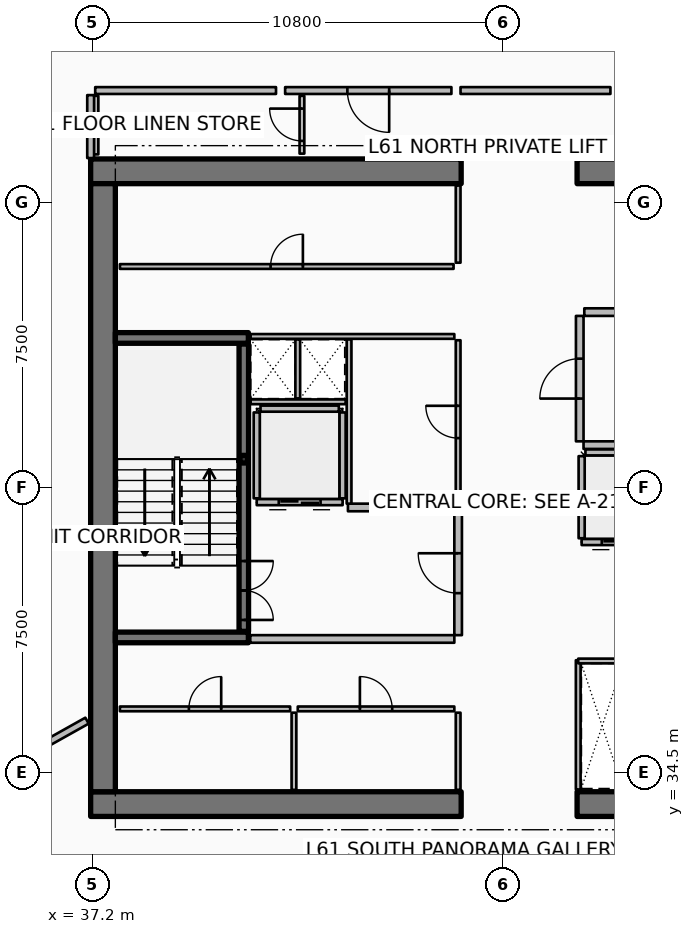
"""IFC4 building model, lengths in metres.
Left out: names, types, materials, properties, quantities, classifications, styles, units other than length and angle.
Written with IfcOpenShell. Run it as: python <this file> out.ifc"""

import sys

from ifc_helpers import new_model, si_unit, direction, frame, frame_2d, origin, origin_2d, place, context, subcontext, project, spatial, rectangle, hollow_rectangle, extrude, element, fill, save


model = new_model("IFC4")
c1 = context("Model", 3, precision=1e-05, world=origin(), true_north=direction((0.0, 1.0)))
c2 = subcontext(c1, "Body", "Model", "MODEL_VIEW")
j1 = project(units=[si_unit("LENGTHUNIT", "METRE"), si_unit("PLANEANGLEUNIT", "RADIAN")], contexts=[c1])
p1 = place(None, origin())
s1 = spatial("IfcSite", under=j1, at=p1, CompositionType="ELEMENT")
p2 = place(p1, origin())
s2 = spatial("IfcBuilding", under=s1, at=p2, CompositionType="ELEMENT")
p3 = place(p2, frame((0.0, 0.0, 244.4)))
s3 = spatial("IfcBuildingStorey", under=s2, at=p3, CompositionType="ELEMENT", Elevation=244.4)
for number, where, z_axis, x_axis in (
    (1, (37.15, 33.675, 0.0), (0.0, 0.0, 1.0), (1.0, 0.0, 0.0)),
    (2, (49.95, 33.675, 0.0), (0.0, 0.0, 1.0), (1.0, 0.0, 0.0)),
    (3, (37.15, 50.325, 0.0), (0.0, 0.0, 1.0), (1.0, 0.0, 0.0)),
    (4, (49.95, 50.325, 0.0), (0.0, 0.0, 1.0), (1.0, 0.0, 0.0)),
):
    element("IfcWall", number, at=place(p3, frame(where, z_axis=z_axis, x_axis=x_axis)), inside=s3, PredefinedType="SHEAR", context=c2, shape_type="SweptSolid", body=[
        extrude(rectangle(XDim=9.75, YDim=0.65, at=frame_2d((4.875, 0.0))), origin(), (0.0, 0.0, 1.0), 3.85),
    ])
p4 = place(p3, frame((37.475, 34.0, 0.0), z_axis=(0.0, 0.0, 1.0), x_axis=(0.0, 1.0, 0.0)))
e5 = element("IfcWall", 5, at=p4, inside=s3, PredefinedType="SHEAR", context=c2, shape_type="SweptSolid", body=[
    extrude(rectangle(XDim=16.0, YDim=0.65, at=frame_2d((8.0, 0.0))), origin(), (0.0, 0.0, 1.0), 3.85),
])
for number, where, z_axis, x_axis in (
    (6, (37.8, 38.06, 0.0), (0.0, 0.0, 1.0), (1.0, 0.0, 0.0)),
    (7, (37.8, 45.94, 0.0), (0.0, 0.0, 1.0), (1.0, 0.0, 0.0)),
):
    element("IfcWall", number, at=place(p3, frame(where, z_axis=z_axis, x_axis=x_axis)), inside=s3, PredefinedType="SHEAR", context=c2, shape_type="SweptSolid", body=[
        extrude(rectangle(XDim=3.5, YDim=0.28, at=frame_2d((1.75, 0.0))), origin(), (0.0, 0.0, 1.0), 3.85),
    ])
p5 = place(p3, frame((41.18, 42.75, 0.0), z_axis=(0.0, 0.0, 1.0), x_axis=(1.0, 0.0, 0.0)))
e8 = element("IfcColumn", 8, at=p5, inside=s3, PredefinedType="COLUMN", context=c2, shape_type="SweptSolid", body=[
    extrude(hollow_rectangle(XDim=0.2, YDim=0.2, WallThickness=0.01, InnerFilletRadius=0.01, OuterFilletRadius=0.02, at=origin_2d()), origin(), (0.0, 0.0, 1.0), 1.72),
])
p6 = place(p3, frame((41.18, 38.22, 0.0), z_axis=(0.0, 0.0, 1.0), x_axis=(0.0, 1.0, 0.0)))
e9 = element("IfcWall", 9, at=p6, inside=s3, PredefinedType="SOLIDWALL", context=c2, shape_type="SweptSolid", body=[
    extrude(rectangle(XDim=7.56, YDim=0.25, at=frame_2d((3.78, 0.0))), origin(), (0.0, 0.0, 1.0), 3.59),
])
p7 = place(p6, frame((0.3, 0.0, 0.0)))
e10 = element("IfcOpeningElement", 10, at=p7, cuts=e9, PredefinedType="OPENING", context=c2, shape_type="SweptSolid", body=[
    extrude(rectangle(XDim=1.55, YDim=2.15, at=frame_2d((0.775, 1.075))), frame((0.0, 0.135, 0.0), z_axis=(0.0, -1.0, 0.0), x_axis=(1.0, 0.0, 0.0)), (0.0, 0.0, 1.0), 0.27),
])
p8 = place(p3, frame((43.78, 41.62, 0.0), z_axis=(0.0, 0.0, 1.0), x_axis=(-1.0, 0.0, 0.0)))
e11 = element("IfcWall", 11, at=p8, inside=s3, PredefinedType="PARTITIONING", context=c2, shape_type="SweptSolid", body=[
    extrude(rectangle(XDim=2.26, YDim=0.16, at=frame_2d((1.13, 0.0))), origin(), (0.0, 0.0, 1.0), 3.59),
])
p9 = place(p8, frame((0.58, 0.0, 0.0)))
e12 = element("IfcOpeningElement", 12, at=p9, cuts=e11, PredefinedType="OPENING", context=c2, shape_type="SweptSolid", body=[
    extrude(rectangle(XDim=1.1, YDim=2.1, at=frame_2d((0.55, 1.05))), frame((0.0, 0.09, 0.0), z_axis=(0.0, -1.0, 0.0), x_axis=(1.0, 0.0, 0.0)), (0.0, 0.0, 1.0), 0.18),
])
for number, where, z_axis, x_axis in (
    (13, (43.78, 41.72, 0.0), (0.0, 0.0, 1.0), (0.0, 1.0, 0.0)),
    (14, (41.52, 41.72, 0.0), (0.0, 0.0, 1.0), (0.0, 1.0, 0.0)),
):
    element("IfcWall", number, at=place(p3, frame(where, z_axis=z_axis, x_axis=x_axis)), inside=s3, PredefinedType="PARTITIONING", context=c2, shape_type="SweptSolid", body=[
        extrude(rectangle(XDim=2.26, YDim=0.16, at=frame_2d((1.13, 0.0))), origin(), (0.0, 0.0, 1.0), 3.59),
    ])
p10 = place(p3, frame((41.62, 44.08, 0.0), z_axis=(0.0, 0.0, 1.0), x_axis=(1.0, 0.0, 0.0)))
e15 = element("IfcWall", 15, at=p10, inside=s3, PredefinedType="PARTITIONING", context=c2, shape_type="SweptSolid", body=[
    extrude(rectangle(XDim=2.06, YDim=0.16, at=frame_2d((1.03, 0.0))), origin(), (0.0, 0.0, 1.0), 3.59),
])
p11 = place(p3, frame((52.23, 40.57, 0.0), z_axis=(0.0, 0.0, 1.0), x_axis=(-1.0, 0.0, 0.0)))
e16 = element("IfcWall", 16, at=p11, inside=s3, PredefinedType="PARTITIONING", context=c2, shape_type="SweptSolid", body=[
    extrude(rectangle(XDim=2.16, YDim=0.16, at=frame_2d((1.08, 0.0))), origin(), (0.0, 0.0, 1.0), 3.59),
])
p12 = place(p11, frame((0.53, 0.0, 0.0)))
e17 = element("IfcOpeningElement", 17, at=p12, cuts=e16, PredefinedType="OPENING", context=c2, shape_type="SweptSolid", body=[
    extrude(rectangle(XDim=1.1, YDim=2.1, at=frame_2d((0.55, 1.05))), frame((0.0, 0.09, 0.0), z_axis=(0.0, -1.0, 0.0), x_axis=(1.0, 0.0, 0.0)), (0.0, 0.0, 1.0), 0.18),
])
p13 = place(p3, frame((50.07, 40.67, 0.0), z_axis=(0.0, 0.0, 1.0), x_axis=(0.0, 1.0, 0.0)))
e18 = element("IfcWall", 18, at=p13, inside=s3, PredefinedType="PARTITIONING", context=c2, shape_type="SweptSolid", body=[
    extrude(rectangle(XDim=2.16, YDim=0.16, at=frame_2d((1.08, 0.0))), origin(), (0.0, 0.0, 1.0), 3.59),
])
p14 = place(p3, frame((50.17, 42.93, 0.0), z_axis=(0.0, 0.0, 1.0), x_axis=(1.0, 0.0, 0.0)))
e19 = element("IfcWall", 19, at=p14, inside=s3, PredefinedType="PARTITIONING", context=c2, shape_type="SweptSolid", body=[
    extrude(rectangle(XDim=1.96, YDim=0.16, at=frame_2d((0.98, 0.0))), origin(), (0.0, 0.0, 1.0), 3.59),
])
for number, where, z_axis, x_axis in (
    (20, (46.82, 34.05, 0.0), (0.0, 0.0, 1.0), (0.0, 1.0, 0.0)),
    (21, (42.5, 34.05, 0.0), (0.0, 0.0, 1.0), (0.0, 1.0, 0.0)),
):
    element("IfcWall", number, at=place(p3, frame(where, z_axis=z_axis, x_axis=x_axis)), inside=s3, PredefinedType="PARTITIONING", context=c2, shape_type="SweptSolid", body=[
        extrude(rectangle(XDim=2.03, YDim=0.125, at=frame_2d((1.015, 0.0))), origin(), (0.0, 0.0, 1.0), 3.03),
    ])
p15 = place(p3, frame((37.92, 36.18, 0.0), z_axis=(0.0, 0.0, 1.0), x_axis=(1.0, 0.0, 0.0)))
e22 = element("IfcWall", 22, at=p15, inside=s3, PredefinedType="PARTITIONING", context=c2, shape_type="SweptSolid", body=[
    extrude(rectangle(XDim=4.48, YDim=0.125, at=frame_2d((2.24, 0.0))), origin(), (0.0, 0.0, 1.0), 3.03),
])
p16 = place(p15, frame((1.815, 0.0, 0.0)))
e23 = element("IfcOpeningElement", 23, at=p16, cuts=e22, PredefinedType="OPENING", context=c2, shape_type="SweptSolid", body=[
    extrude(rectangle(XDim=0.85, YDim=2.06, at=frame_2d((0.425, 1.03))), frame((0.0, 0.073, 0.0), z_axis=(0.0, -1.0, 0.0), x_axis=(1.0, 0.0, 0.0)), (0.0, 0.0, 1.0), 0.145),
])
p17 = place(p3, frame((42.6, 36.18, 0.0), z_axis=(0.0, 0.0, 1.0), x_axis=(1.0, 0.0, 0.0)))
e24 = element("IfcWall", 24, at=p17, inside=s3, PredefinedType="PARTITIONING", context=c2, shape_type="SweptSolid", body=[
    extrude(rectangle(XDim=4.12, YDim=0.125, at=frame_2d((2.06, 0.0))), origin(), (0.0, 0.0, 1.0), 3.03),
])
p18 = place(p17, frame((1.635, 0.0, 0.0)))
e25 = element("IfcOpeningElement", 25, at=p18, cuts=e24, PredefinedType="OPENING", context=c2, shape_type="SweptSolid", body=[
    extrude(rectangle(XDim=0.85, YDim=2.06, at=frame_2d((0.425, 1.03))), frame((0.0, 0.073, 0.0), z_axis=(0.0, -1.0, 0.0), x_axis=(1.0, 0.0, 0.0)), (0.0, 0.0, 1.0), 0.145),
])
p19 = place(p3, frame((46.82, 47.92, 0.0), z_axis=(0.0, 0.0, 1.0), x_axis=(0.0, 1.0, 0.0)))
e26 = element("IfcWall", 26, at=p19, inside=s3, PredefinedType="PARTITIONING", context=c2, shape_type="SweptSolid", body=[
    extrude(rectangle(XDim=2.03, YDim=0.125, at=frame_2d((1.015, 0.0))), origin(), (0.0, 0.0, 1.0), 3.03),
])
p20 = place(p3, frame((37.92, 47.82, 0.0), z_axis=(0.0, 0.0, 1.0), x_axis=(1.0, 0.0, 0.0)))
e27 = element("IfcWall", 27, at=p20, inside=s3, PredefinedType="PARTITIONING", context=c2, shape_type="SweptSolid", body=[
    extrude(rectangle(XDim=8.78, YDim=0.125, at=frame_2d((4.39, 0.0))), origin(), (0.0, 0.0, 1.0), 3.03),
])
p21 = place(p20, frame((3.965, 0.0, 0.0)))
e28 = element("IfcOpeningElement", 28, at=p21, cuts=e27, PredefinedType="OPENING", context=c2, shape_type="SweptSolid", body=[
    extrude(rectangle(XDim=0.85, YDim=2.06, at=frame_2d((0.425, 1.03))), frame((0.0, 0.073, 0.0), z_axis=(0.0, -1.0, 0.0), x_axis=(1.0, 0.0, 0.0)), (0.0, 0.0, 1.0), 0.145),
])
p22 = place(p3, frame((41.35, 38.02, 0.0), z_axis=(0.0, 0.0, 1.0), x_axis=(1.0, 0.0, 0.0)))
e29 = element("IfcWall", 29, at=p22, inside=s3, PredefinedType="PARTITIONING", context=c2, shape_type="SweptSolid", body=[
    extrude(rectangle(XDim=5.37, YDim=0.2, at=frame_2d((2.685, 0.0))), origin(), (0.0, 0.0, 1.0), 3.59),
])
p23 = place(p3, frame((43.92, 41.48, 0.0), z_axis=(0.0, 0.0, 1.0), x_axis=(1.0, 0.0, 0.0)))
e30 = element("IfcWall", 30, at=p23, inside=s3, PredefinedType="PARTITIONING", context=c2, shape_type="SweptSolid", body=[
    extrude(rectangle(XDim=2.8, YDim=0.2, at=frame_2d((1.4, 0.0))), origin(), (0.0, 0.0, 1.0), 3.59),
])
p24 = place(p3, frame((46.82, 38.12, 0.0), z_axis=(0.0, 0.0, 1.0), x_axis=(0.0, 1.0, 0.0)))
e31 = element("IfcWall", 31, at=p24, inside=s3, PredefinedType="PARTITIONING", context=c2, shape_type="SweptSolid", body=[
    extrude(rectangle(XDim=3.26, YDim=0.2, at=frame_2d((1.63, 0.0))), origin(), (0.0, 0.0, 1.0), 3.59),
])
p25 = place(p24, frame((1.105, 0.0, 0.0)))
e32 = element("IfcOpeningElement", 32, at=p25, cuts=e31, PredefinedType="OPENING", context=c2, shape_type="SweptSolid", body=[
    extrude(rectangle(XDim=1.05, YDim=2.1, at=frame_2d((0.525, 1.05))), frame((0.0, 0.11, 0.0), z_axis=(0.0, -1.0, 0.0), x_axis=(1.0, 0.0, 0.0)), (0.0, 0.0, 1.0), 0.22),
])
p26 = place(p3, frame((50.12, 43.12, 0.0), z_axis=(0.0, 0.0, 1.0), x_axis=(1.0, 0.0, 0.0)))
e33 = element("IfcWall", 33, at=p26, inside=s3, PredefinedType="PARTITIONING", context=c2, shape_type="SweptSolid", body=[
    extrude(rectangle(XDim=8.88, YDim=0.2, at=frame_2d((4.44, 0.0))), origin(), (0.0, 0.0, 1.0), 3.59),
])
p27 = place(p3, frame((50.14, 46.62, 0.0), z_axis=(0.0, 0.0, 1.0), x_axis=(1.0, 0.0, 0.0)))
e34 = element("IfcWall", 34, at=p27, inside=s3, PredefinedType="PARTITIONING", context=c2, shape_type="SweptSolid", body=[
    extrude(rectangle(XDim=1.02, YDim=0.2, at=frame_2d((0.51, 0.0))), origin(), (0.0, 0.0, 1.0), 3.59),
])
p28 = place(p3, frame((50.02, 43.22, 0.0), z_axis=(0.0, 0.0, 1.0), x_axis=(0.0, 1.0, 0.0)))
e35 = element("IfcWall", 35, at=p28, inside=s3, PredefinedType="PARTITIONING", context=c2, shape_type="SweptSolid", body=[
    extrude(rectangle(XDim=3.3, YDim=0.2, at=frame_2d((1.65, 0.0))), origin(), (0.0, 0.0, 1.0), 3.59),
])
p29 = place(p28, frame((1.125, 0.0, 0.0)))
e36 = element("IfcOpeningElement", 36, at=p29, cuts=e35, PredefinedType="OPENING", context=c2, shape_type="SweptSolid", body=[
    extrude(rectangle(XDim=1.05, YDim=2.1, at=frame_2d((0.525, 1.05))), frame((0.0, 0.11, 0.0), z_axis=(0.0, -1.0, 0.0), x_axis=(1.0, 0.0, 0.0)), (0.0, 0.0, 1.0), 0.22),
])
p30 = place(p3, frame((41.36, 45.98, 0.0), z_axis=(0.0, 0.0, 1.0), x_axis=(1.0, 0.0, 0.0)))
e37 = element("IfcWall", 37, at=p30, inside=s3, PredefinedType="PARTITIONING", context=c2, shape_type="SweptSolid", body=[
    extrude(rectangle(XDim=5.36, YDim=0.125, at=frame_2d((2.68, 0.0))), origin(), (0.0, 0.0, 1.0), 3.03),
])
p31 = place(p3, frame((41.36, 44.26, 0.0), z_axis=(0.0, 0.0, 1.0), x_axis=(1.0, 0.0, 0.0)))
e38 = element("IfcWall", 38, at=p31, inside=s3, PredefinedType="PARTITIONING", context=c2, shape_type="SweptSolid", body=[
    extrude(rectangle(XDim=2.5, YDim=0.125, at=frame_2d((1.25, 0.0))), origin(), (0.0, 0.0, 1.0), 3.03),
])
p32 = place(p3, frame((42.6, 44.35, 0.0), z_axis=(0.0, 0.0, 1.0), x_axis=(0.0, 1.0, 0.0)))
e39 = element("IfcWall", 39, at=p32, inside=s3, PredefinedType="PARTITIONING", context=c2, shape_type="SweptSolid", body=[
    extrude(rectangle(XDim=1.55, YDim=0.125, at=frame_2d((0.775, 0.0))), origin(), (0.0, 0.0, 1.0), 3.03),
])
p33 = place(p3, frame((49.98, 34.06, 0.0), z_axis=(0.0, 0.0, 1.0), x_axis=(0.0, 1.0, 0.0)))
e40 = element("IfcWall", 40, at=p33, inside=s3, PredefinedType="PARTITIONING", context=c2, shape_type="SweptSolid", body=[
    extrude(rectangle(XDim=3.4, YDim=0.125, at=frame_2d((1.7, 0.0))), origin(), (0.0, 0.0, 1.0), 3.03),
])
p34 = place(p3, frame((49.98, 37.44, 0.0), z_axis=(0.0, 0.0, 1.0), x_axis=(1.0, 0.0, 0.0)))
e41 = element("IfcWall", 41, at=p34, inside=s3, PredefinedType="PARTITIONING", context=c2, shape_type="SweptSolid", body=[
    extrude(rectangle(XDim=1.26, YDim=0.125, at=frame_2d((0.63, 0.0))), origin(), (0.0, 0.0, 1.0), 3.03),
])
p35 = place(p3, frame((43.95, 41.58, 0.0), z_axis=(0.0, 0.0, 1.0), x_axis=(0.0, 1.0, 0.0)))
e42 = element("IfcWall", 42, at=p35, inside=s3, PredefinedType="PARTITIONING", context=c2, shape_type="SweptSolid", body=[
    extrude(rectangle(XDim=4.32, YDim=0.125, at=frame_2d((2.16, 0.0))), origin(), (0.0, 0.0, 1.0), 3.03),
])
p36 = place(p3, frame((46.82, 41.58, 0.0), z_axis=(0.0, 0.0, 1.0), x_axis=(0.0, 1.0, 0.0)))
e43 = element("IfcWall", 43, at=p36, inside=s3, PredefinedType="PARTITIONING", context=c2, shape_type="SweptSolid", body=[
    extrude(rectangle(XDim=4.3, YDim=0.125, at=frame_2d((2.15, 0.0))), origin(), (0.0, 0.0, 1.0), 3.03),
])
p37 = place(p36, frame((1.725, 0.0, 0.0)))
e44 = element("IfcOpeningElement", 44, at=p37, cuts=e43, PredefinedType="OPENING", context=c2, shape_type="SweptSolid", body=[
    extrude(rectangle(XDim=0.85, YDim=2.06, at=frame_2d((0.425, 1.03))), frame((0.0, 0.073, 0.0), z_axis=(0.0, -1.0, 0.0), x_axis=(1.0, 0.0, 0.0)), (0.0, 0.0, 1.0), 0.145),
])
p38 = place(p3, frame((37.29, 50.77, 0.0), z_axis=(0.0, 0.0, 1.0), x_axis=(0.0, 1.0, 0.0)))
e45 = element("IfcWall", 45, at=p38, inside=s3, PredefinedType="PARTITIONING", context=c2, shape_type="SweptSolid", body=[
    extrude(rectangle(XDim=1.54, YDim=0.125, at=frame_2d((0.77, 0.0))), origin(), (0.0, 0.0, 1.0), 3.03),
])
p39 = place(p3, frame((42.71, 50.79, 0.0), z_axis=(0.0, 0.0, 1.0), x_axis=(0.0, 1.0, 0.0)))
e46 = element("IfcWall", 46, at=p39, inside=s3, PredefinedType="PARTITIONING", context=c2, shape_type="SweptSolid", body=[
    extrude(rectangle(XDim=1.52, YDim=0.125, at=frame_2d((0.76, 0.0))), origin(), (0.0, 0.0, 1.0), 2.957),
])
p40 = place(p39, frame((0.335, 0.0, 0.0)))
e47 = element("IfcOpeningElement", 47, at=p40, cuts=e46, PredefinedType="OPENING", context=c2, shape_type="SweptSolid", body=[
    extrude(rectangle(XDim=0.85, YDim=2.06, at=frame_2d((0.425, 1.03))), frame((0.0, 0.073, 0.0), z_axis=(0.0, -1.0, 0.0), x_axis=(1.0, 0.0, 0.0)), (0.0, 0.0, 1.0), 0.145),
])
p41 = place(p3, frame((37.054, 35.87, 0.0), z_axis=(0.0, 0.0, 1.0), x_axis=(-0.872490186067, -0.488631635506, 0.0)))
e48 = element("IfcWall", 48, at=p41, inside=s3, PredefinedType="PARTITIONING", context=c2, shape_type="SweptSolid", body=[
    extrude(rectangle(XDim=17.884, YDim=0.18, at=frame_2d((8.942, 0.0))), origin(), (0.0, 0.0, 1.0), 2.957),
])
p42 = place(p3, frame((46.643, 52.45, 0.0), z_axis=(0.0, 0.0, 1.0), x_axis=(-1.0, 0.0, 0.0)))
e49 = element("IfcWall", 49, at=p42, inside=s3, PredefinedType="PARTITIONING", context=c2, shape_type="SweptSolid", body=[
    extrude(rectangle(XDim=4.376, YDim=0.18, at=frame_2d((2.188, 0.0))), origin(), (0.0, 0.0, 1.0), 2.957),
])
p43 = place(p42, frame((1.638, 0.0, 0.0)))
e50 = element("IfcOpeningElement", 50, at=p43, cuts=e49, PredefinedType="OPENING", context=c2, shape_type="SweptSolid", body=[
    extrude(rectangle(XDim=1.1, YDim=2.1, at=frame_2d((0.55, 1.05))), frame((0.0, 0.1, 0.0), z_axis=(0.0, -1.0, 0.0), x_axis=(1.0, 0.0, 0.0)), (0.0, 0.0, 1.0), 0.2),
])
p44 = place(p3, frame((50.827, 52.45, 0.0), z_axis=(0.0, 0.0, 1.0), x_axis=(-1.0, 0.0, 0.0)))
e51 = element("IfcWall", 51, at=p44, inside=s3, PredefinedType="PARTITIONING", context=c2, shape_type="SweptSolid", body=[
    extrude(rectangle(XDim=3.944, YDim=0.18, at=frame_2d((1.972, 0.0))), origin(), (0.0, 0.0, 1.0), 2.957),
])
p45 = place(p3, frame((42.028, 52.45, 0.0), z_axis=(0.0, 0.0, 1.0), x_axis=(-1.0, 0.0, 0.0)))
e52 = element("IfcWall", 52, at=p45, inside=s3, PredefinedType="PARTITIONING", context=c2, shape_type="SweptSolid", body=[
    extrude(rectangle(XDim=4.758, YDim=0.18, at=frame_2d((2.379, 0.0))), origin(), (0.0, 0.0, 1.0), 2.957),
])
p46 = place(p3, frame((37.15, 52.33, 0.0), z_axis=(0.0, 0.0, 1.0), x_axis=(0.0, -1.0, 0.0)))
e53 = element("IfcWall", 53, at=p46, inside=s3, PredefinedType="PARTITIONING", context=c2, shape_type="SweptSolid", body=[
    extrude(rectangle(XDim=1.656, YDim=0.18, at=frame_2d((0.828, 0.0))), origin(), (0.0, 0.0, 1.0), 2.957),
])
p47 = place(p7, origin())
e54 = element("IfcDoor", 54, at=p47, inside=s3, OperationType="DOUBLE_DOOR_SINGLE_SWING", PredefinedType="DOOR", context=c2, shape_type="SweptSolid", body=[
    extrude(rectangle(XDim=1.55, YDim=2.15, at=frame_2d((0.775, 1.075))), frame((0.0, 0.025, 0.0), z_axis=(0.0, -1.0, 0.0), x_axis=(1.0, 0.0, 0.0)), (0.0, 0.0, 1.0), 0.05),
])
fill(e10, e54)
p48 = place(p9, origin())
e55 = element("IfcDoor", 55, at=p48, inside=s3, OperationType="DOUBLE_DOOR_SLIDING", PredefinedType="DOOR", context=c2, shape_type="SweptSolid", body=[
    extrude(rectangle(XDim=1.1, YDim=2.1, at=frame_2d((0.55, 1.05))), frame((0.0, 0.025, 0.0), z_axis=(0.0, -1.0, 0.0), x_axis=(1.0, 0.0, 0.0)), (0.0, 0.0, 1.0), 0.05),
])
fill(e12, e55)
p49 = place(p12, origin())
e56 = element("IfcDoor", 56, at=p49, inside=s3, OperationType="DOUBLE_DOOR_SLIDING", PredefinedType="DOOR", context=c2, shape_type="SweptSolid", body=[
    extrude(rectangle(XDim=1.1, YDim=2.1, at=frame_2d((0.55, 1.05))), frame((0.0, 0.025, 0.0), z_axis=(0.0, -1.0, 0.0), x_axis=(1.0, 0.0, 0.0)), (0.0, 0.0, 1.0), 0.05),
])
fill(e17, e56)
p50 = place(p16, origin())
e57 = element("IfcDoor", 57, at=p50, inside=s3, OperationType="SINGLE_SWING_RIGHT", PredefinedType="DOOR", context=c2, shape_type="SweptSolid", body=[
    extrude(rectangle(XDim=0.85, YDim=2.06, at=frame_2d((0.425, 1.03))), frame((0.0, 0.025, 0.0), z_axis=(0.0, -1.0, 0.0), x_axis=(1.0, 0.0, 0.0)), (0.0, 0.0, 1.0), 0.05),
])
fill(e23, e57)
p51 = place(p18, origin())
e58 = element("IfcDoor", 58, at=p51, inside=s3, OperationType="SINGLE_SWING_LEFT", PredefinedType="DOOR", context=c2, shape_type="SweptSolid", body=[
    extrude(rectangle(XDim=0.85, YDim=2.06, at=frame_2d((0.425, 1.03))), frame((0.0, 0.025, 0.0), z_axis=(0.0, -1.0, 0.0), x_axis=(1.0, 0.0, 0.0)), (0.0, 0.0, 1.0), 0.05),
])
fill(e25, e58)
p52 = place(p21, origin())
e59 = element("IfcDoor", 59, at=p52, inside=s3, OperationType="SINGLE_SWING_RIGHT", PredefinedType="DOOR", context=c2, shape_type="SweptSolid", body=[
    extrude(rectangle(XDim=0.85, YDim=2.06, at=frame_2d((0.425, 1.03))), frame((0.0, 0.025, 0.0), z_axis=(0.0, -1.0, 0.0), x_axis=(1.0, 0.0, 0.0)), (0.0, 0.0, 1.0), 0.05),
])
fill(e28, e59)
p53 = place(p25, origin())
e60 = element("IfcDoor", 60, at=p53, inside=s3, OperationType="SINGLE_SWING_RIGHT", PredefinedType="DOOR", context=c2, shape_type="SweptSolid", body=[
    extrude(rectangle(XDim=1.05, YDim=2.1, at=frame_2d((0.525, 1.05))), frame((0.0, 0.025, 0.0), z_axis=(0.0, -1.0, 0.0), x_axis=(1.0, 0.0, 0.0)), (0.0, 0.0, 1.0), 0.05),
])
fill(e32, e60)
p54 = place(p29, origin())
e61 = element("IfcDoor", 61, at=p54, inside=s3, OperationType="SINGLE_SWING_LEFT", PredefinedType="DOOR", context=c2, shape_type="SweptSolid", body=[
    extrude(rectangle(XDim=1.05, YDim=2.1, at=frame_2d((0.525, 1.05))), frame((0.0, 0.025, 0.0), z_axis=(0.0, -1.0, 0.0), x_axis=(1.0, 0.0, 0.0)), (0.0, 0.0, 1.0), 0.05),
])
fill(e36, e61)
p55 = place(p37, origin())
e62 = element("IfcDoor", 62, at=p55, inside=s3, OperationType="SINGLE_SWING_RIGHT", PredefinedType="DOOR", context=c2, shape_type="SweptSolid", body=[
    extrude(rectangle(XDim=0.85, YDim=2.06, at=frame_2d((0.425, 1.03))), frame((0.0, 0.025, 0.0), z_axis=(0.0, -1.0, 0.0), x_axis=(1.0, 0.0, 0.0)), (0.0, 0.0, 1.0), 0.05),
])
fill(e44, e62)
p56 = place(p40, origin())
e63 = element("IfcDoor", 63, at=p56, inside=s3, OperationType="SINGLE_SWING_RIGHT", PredefinedType="DOOR", context=c2, shape_type="SweptSolid", body=[
    extrude(rectangle(XDim=0.85, YDim=2.06, at=frame_2d((0.425, 1.03))), frame((0.0, 0.025, 0.0), z_axis=(0.0, -1.0, 0.0), x_axis=(1.0, 0.0, 0.0)), (0.0, 0.0, 1.0), 0.05),
])
fill(e47, e63)
p57 = place(p43, origin())
e64 = element("IfcDoor", 64, at=p57, inside=s3, OperationType="SINGLE_SWING_LEFT", PredefinedType="DOOR", context=c2, shape_type="SweptSolid", body=[
    extrude(rectangle(XDim=1.1, YDim=2.1, at=frame_2d((0.55, 1.05))), frame((0.0, 0.025, 0.0), z_axis=(0.0, -1.0, 0.0), x_axis=(1.0, 0.0, 0.0)), (0.0, 0.0, 1.0), 0.05),
])
fill(e50, e64)
save(model, sys.argv[1])
